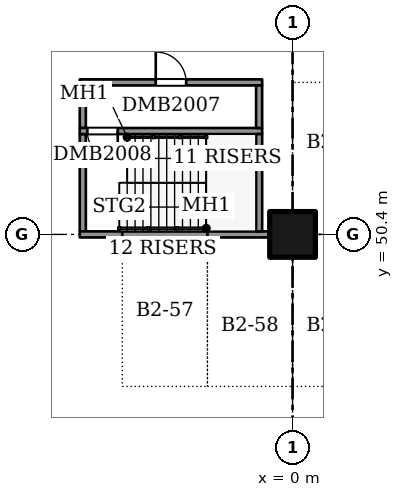
"""IFC4 building model, lengths in metres.
Left out: names, types, materials, properties, quantities, classifications, styles, units other than length and angle.
Written with IfcOpenShell. Run it as: python <this file> out.ifc"""

import sys

from ifc_helpers import new_model, si_unit, direction, frame, frame_2d, origin, origin_2d, place, context, subcontext, project, spatial, rectangle, extrude, element, fill, save


model = new_model("IFC4")
c1 = context("Model", 3, precision=1e-05, world=origin(), true_north=direction((0.0, 1.0)))
c2 = subcontext(c1, "Body", "Model", "MODEL_VIEW")
j1 = project(units=[si_unit("LENGTHUNIT", "METRE"), si_unit("PLANEANGLEUNIT", "RADIAN")], contexts=[c1])
p1 = place(None, origin())
s1 = spatial("IfcSite", under=j1, at=p1, CompositionType="ELEMENT")
p2 = place(p1, origin())
s2 = spatial("IfcBuilding", under=s1, at=p2, CompositionType="ELEMENT")
p3 = place(p2, frame((0.0, 0.0, -8.0)))
s3 = spatial("IfcBuildingStorey", under=s2, at=p3, CompositionType="ELEMENT", Elevation=-8.0)
p4 = place(p3, frame((0.0, 50.4, 0.0), z_axis=(0.0, 0.0, 1.0), x_axis=(1.0, 0.0, 0.0)))
e1 = element("IfcColumn", 1, at=p4, inside=s3, PredefinedType="COLUMN", context=c2, shape_type="SweptSolid", body=[
    extrude(rectangle(XDim=1.5, YDim=1.5, at=origin_2d()), origin(), (0.0, 0.0, 1.0), 3.7),
])
p5 = place(p3, frame((-6.9, 50.5, 0.0), z_axis=(0.0, 0.0, 1.0), x_axis=(0.0, 1.0, 0.0)))
e2 = element("IfcWall", 2, at=p5, inside=s3, PredefinedType="SOLIDWALL", context=c2, shape_type="SweptSolid", body=[
    extrude(rectangle(XDim=3.2, YDim=0.2, at=frame_2d((1.6, 0.0))), origin(), (0.0, 0.0, 1.0), 3.7),
])
p6 = place(p3, frame((-7.0, 50.4, 0.0), z_axis=(0.0, 0.0, 1.0), x_axis=(1.0, 0.0, 0.0)))
e3 = element("IfcWall", 3, at=p6, inside=s3, PredefinedType="SOLIDWALL", context=c2, shape_type="SweptSolid", body=[
    extrude(rectangle(XDim=1.4, YDim=0.2, at=frame_2d((0.7, 0.0))), origin(), (0.0, 0.0, 1.0), 3.7),
])
p7 = place(p3, frame((-6.9, 53.9, 0.0), z_axis=(0.0, 0.0, 1.0), x_axis=(0.0, 1.0, 0.0)))
e4 = element("IfcWall", 4, at=p7, inside=s3, PredefinedType="SOLIDWALL", context=c2, shape_type="SweptSolid", body=[
    extrude(rectangle(XDim=1.4, YDim=0.2, at=frame_2d((0.7, 0.0))), origin(), (0.0, 0.0, 1.0), 3.7),
])
p8 = place(p3, frame((-7.0, 53.8, 0.0), z_axis=(0.0, 0.0, 1.0), x_axis=(1.0, 0.0, 0.0)))
e5 = element("IfcWall", 5, at=p8, inside=s3, PredefinedType="SOLIDWALL", context=c2, shape_type="SweptSolid", body=[
    extrude(rectangle(XDim=6.0, YDim=0.2, at=frame_2d((3.0, 0.0))), origin(), (0.0, 0.0, 1.0), 3.7),
])
p9 = place(p8, frame((0.25, 0.0, 0.0)))
e6 = element("IfcOpeningElement", 6, at=p9, cuts=e5, PredefinedType="OPENING", context=c2, shape_type="SweptSolid", body=[
    extrude(rectangle(XDim=1.0, YDim=2.1, at=frame_2d((0.5, 1.05))), frame((0.0, 0.11, 0.0), z_axis=(0.0, -1.0, 0.0), x_axis=(1.0, 0.0, 0.0)), (0.0, 0.0, 1.0), 0.22),
])
p10 = place(p3, frame((-7.0, 55.4, 0.0), z_axis=(0.0, 0.0, 1.0), x_axis=(1.0, 0.0, 0.0)))
e7 = element("IfcWall", 7, at=p10, inside=s3, PredefinedType="SOLIDWALL", context=c2, shape_type="SweptSolid", body=[
    extrude(rectangle(XDim=6.0, YDim=0.2, at=frame_2d((3.0, 0.0))), origin(), (0.0, 0.0, 1.0), 3.7),
])
p11 = place(p10, frame((2.5, 0.0, 0.0)))
e8 = element("IfcOpeningElement", 8, at=p11, cuts=e7, PredefinedType="OPENING", context=c2, shape_type="SweptSolid", body=[
    extrude(rectangle(XDim=1.0, YDim=2.1, at=frame_2d((0.5, 1.05))), frame((0.0, 0.11, 0.0), z_axis=(0.0, -1.0, 0.0), x_axis=(1.0, 0.0, 0.0)), (0.0, 0.0, 1.0), 0.22),
])
p12 = place(p3, frame((-5.6, 50.4, 0.0), z_axis=(0.0, 0.0, 1.0), x_axis=(1.0, 0.0, 0.0)))
e9 = element("IfcWall", 9, at=p12, inside=s3, PredefinedType="SOLIDWALL", context=c2, shape_type="SweptSolid", body=[
    extrude(rectangle(XDim=2.8, YDim=0.2, at=frame_2d((1.4, 0.0))), origin(), (0.0, 0.0, 1.0), 3.7),
])
p13 = place(p3, frame((-2.8, 50.4, 0.0), z_axis=(0.0, 0.0, 1.0), x_axis=(1.0, 0.0, 0.0)))
e10 = element("IfcWall", 10, at=p13, inside=s3, PredefinedType="SOLIDWALL", context=c2, shape_type="SweptSolid", body=[
    extrude(rectangle(XDim=2.05, YDim=0.2, at=frame_2d((1.025, 0.0))), origin(), (0.0, 0.0, 1.0), 3.7),
])
p14 = place(p3, frame((-1.1, 50.5, 0.0), z_axis=(0.0, 0.0, 1.0), x_axis=(0.0, 1.0, 0.0)))
e11 = element("IfcWall", 11, at=p14, inside=s3, PredefinedType="SOLIDWALL", context=c2, shape_type="SweptSolid", body=[
    extrude(rectangle(XDim=3.2, YDim=0.2, at=frame_2d((1.6, 0.0))), origin(), (0.0, 0.0, 1.0), 3.7),
])
p15 = place(p3, frame((-1.1, 53.9, 0.0), z_axis=(0.0, 0.0, 1.0), x_axis=(0.0, 1.0, 0.0)))
e12 = element("IfcWall", 12, at=p15, inside=s3, PredefinedType="SOLIDWALL", context=c2, shape_type="SweptSolid", body=[
    extrude(rectangle(XDim=1.4, YDim=0.2, at=frame_2d((0.7, 0.0))), origin(), (0.0, 0.0, 1.0), 3.7),
])
p16 = place(p11, origin())
e13 = element("IfcDoor", 13, at=p16, inside=s3, OperationType="SINGLE_SWING_LEFT", PredefinedType="DOOR", context=c2, shape_type="SweptSolid", body=[
    extrude(rectangle(XDim=1.0, YDim=2.1, at=frame_2d((0.5, 1.05))), frame((0.0, 0.025, 0.0), z_axis=(0.0, -1.0, 0.0), x_axis=(1.0, 0.0, 0.0)), (0.0, 0.0, 1.0), 0.05),
])
fill(e8, e13)
p17 = place(p9, frame((1.0, 0.0, 0.0), z_axis=(0.0, 0.0, 1.0), x_axis=(-1.0, 0.0, 0.0)))
e14 = element("IfcDoor", 14, at=p17, inside=s3, OperationType="SINGLE_SWING_LEFT", PredefinedType="DOOR", context=c2, shape_type="SweptSolid", body=[
    extrude(rectangle(XDim=1.0, YDim=2.1, at=frame_2d((0.5, 1.05))), frame((0.0, 0.025, 0.0), z_axis=(0.0, -1.0, 0.0), x_axis=(1.0, 0.0, 0.0)), (0.0, 0.0, 1.0), 0.05),
])
fill(e6, e14)
save(model, sys.argv[1])
